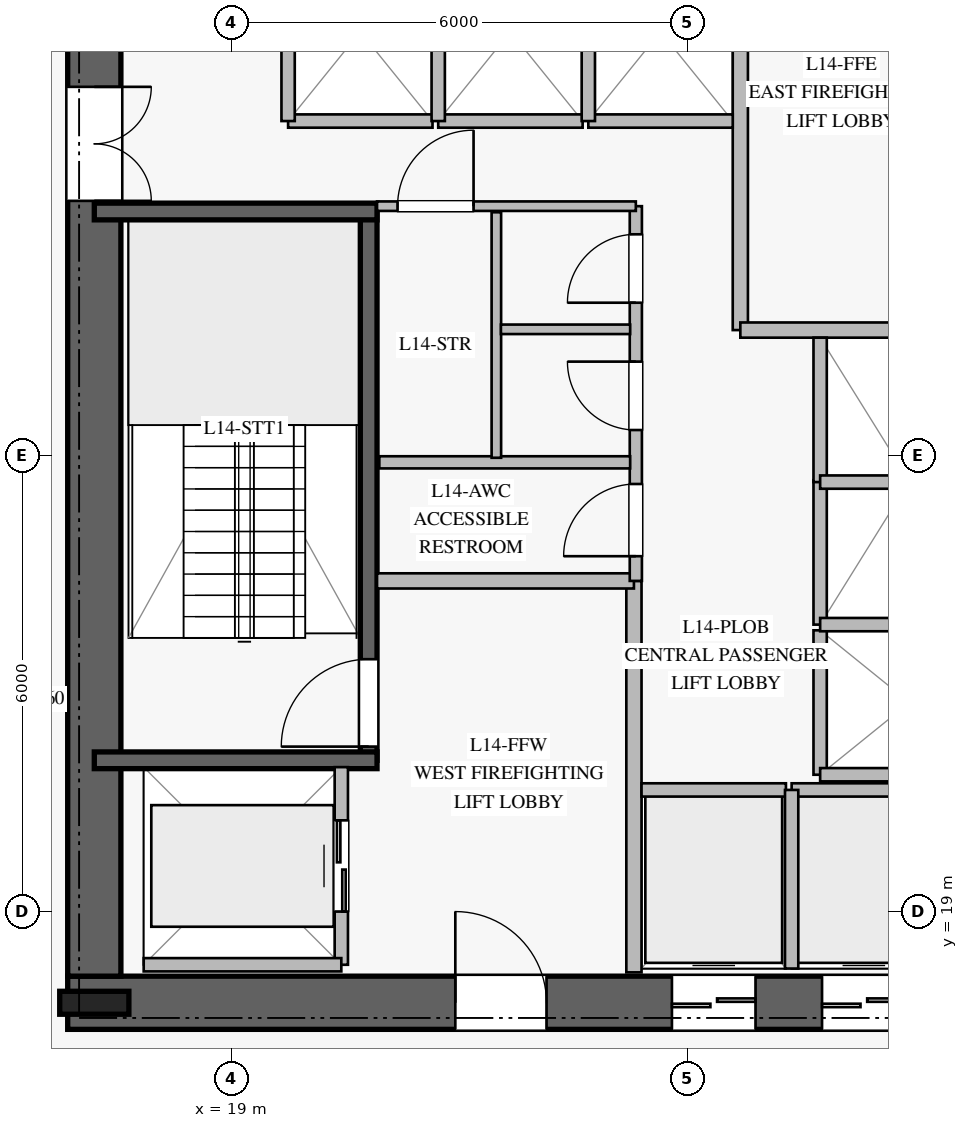
"""IFC4 building model, lengths in metres.
Left out: names, types, materials, properties, quantities, classifications, styles, units other than length and angle.
Written with IfcOpenShell. Run it as: python <this file> out.ifc"""

import sys

from ifc_helpers import new_model, si_unit, direction, frame, frame_2d, origin, origin_2d, place, context, subcontext, project, spatial, rectangle, i_section, extrude, element, fill, save


model = new_model("IFC4")
c1 = context("Model", 3, precision=1e-05, world=origin(), true_north=direction((0.0, 1.0)))
c2 = subcontext(c1, "Body", "Model", "MODEL_VIEW")
j1 = project(units=[si_unit("LENGTHUNIT", "METRE"), si_unit("PLANEANGLEUNIT", "RADIAN")], contexts=[c1])
p1 = place(None, origin())
s1 = spatial("IfcSite", under=j1, at=p1, CompositionType="ELEMENT")
p2 = place(p1, origin())
s2 = spatial("IfcBuilding", under=s1, at=p2, CompositionType="ELEMENT")
p3 = place(p2, frame((0.0, 0.0, 60.0)))
s3 = spatial("IfcBuildingStorey", under=s2, at=p3, CompositionType="ELEMENT", Elevation=60.0)
p4 = place(p3, frame((16.85, 17.8, 0.0), z_axis=(0.0, 0.0, 1.0), x_axis=(1.0, 0.0, 0.0)))
e1 = element("IfcWall", 1, at=p4, inside=s3, PredefinedType="SHEAR", context=c2, shape_type="SweptSolid", body=[
    extrude(rectangle(XDim=16.3, YDim=0.7, at=frame_2d((8.15, 0.0))), origin(), (0.0, 0.0, 1.0), 3.76),
])
p5 = place(p4, frame((5.1, 0.0, 0.0)))
e2 = element("IfcOpeningElement", 2, at=p5, cuts=e1, PredefinedType="OPENING", context=c2, shape_type="SweptSolid", body=[
    extrude(rectangle(XDim=1.2, YDim=2.25, at=frame_2d((0.6, 1.125))), frame((0.0, 0.36, 0.0), z_axis=(0.0, -1.0, 0.0), x_axis=(1.0, 0.0, 0.0)), (0.0, 0.0, 1.0), 0.72),
])
p6 = place(p4, frame((14.05, 0.0, 0.0)))
e3 = element("IfcOpeningElement", 3, at=p6, cuts=e1, PredefinedType="OPENING", context=c2, shape_type="SweptSolid", body=[
    extrude(rectangle(XDim=0.9, YDim=2.1, at=frame_2d((0.45, 1.05))), frame((0.0, 0.36, 0.0), z_axis=(0.0, -1.0, 0.0), x_axis=(1.0, 0.0, 0.0)), (0.0, 0.0, 1.0), 0.72),
])
p7 = place(p4, frame((7.95, 0.0, 0.0)))
e4 = element("IfcOpeningElement", 4, at=p7, cuts=e1, PredefinedType="OPENING", context=c2, shape_type="SweptSolid", body=[
    extrude(rectangle(XDim=1.1, YDim=2.2, at=frame_2d((0.55, 1.1))), frame((0.0, 0.36, 0.0), z_axis=(0.0, -1.0, 0.0), x_axis=(1.0, 0.0, 0.0)), (0.0, 0.0, 1.0), 0.72),
])
p8 = place(p4, frame((9.925, 0.0, 0.0)))
e5 = element("IfcOpeningElement", 5, at=p8, cuts=e1, PredefinedType="OPENING", context=c2, shape_type="SweptSolid", body=[
    extrude(rectangle(XDim=1.1, YDim=2.2, at=frame_2d((0.55, 1.1))), frame((0.0, 0.36, 0.0), z_axis=(0.0, -1.0, 0.0), x_axis=(1.0, 0.0, 0.0)), (0.0, 0.0, 1.0), 0.72),
])
p9 = place(p4, frame((11.9, 0.0, 0.0)))
e6 = element("IfcOpeningElement", 6, at=p9, cuts=e1, PredefinedType="OPENING", context=c2, shape_type="SweptSolid", body=[
    extrude(rectangle(XDim=1.1, YDim=2.2, at=frame_2d((0.55, 1.1))), frame((0.0, 0.36, 0.0), z_axis=(0.0, -1.0, 0.0), x_axis=(1.0, 0.0, 0.0)), (0.0, 0.0, 1.0), 0.72),
])
p10 = place(p3, frame((17.2, 31.85, 0.0), z_axis=(0.0, 0.0, 1.0), x_axis=(0.0, -1.0, 0.0)))
e7 = element("IfcWall", 7, at=p10, inside=s3, PredefinedType="SHEAR", context=c2, shape_type="SweptSolid", body=[
    extrude(rectangle(XDim=13.7, YDim=0.7, at=frame_2d((6.85, 0.0))), origin(), (0.0, 0.0, 1.0), 3.76),
])
p11 = place(p10, frame((2.0, 0.0, 0.0)))
e8 = element("IfcOpeningElement", 8, at=p11, cuts=e7, PredefinedType="OPENING", context=c2, shape_type="SweptSolid", body=[
    extrude(rectangle(XDim=1.5, YDim=2.2, at=frame_2d((0.75, 1.1))), frame((0.0, 0.36, 0.0), z_axis=(0.0, -1.0, 0.0), x_axis=(1.0, 0.0, 0.0)), (0.0, 0.0, 1.0), 0.72),
])
p12 = place(p3, frame((17.2, 17.8, 0.0), z_axis=(0.0, 0.0, 1.0), x_axis=(1.0, 0.0, 0.0)))
e9 = element("IfcColumn", 9, at=p12, inside=s3, PredefinedType="COLUMN", context=c2, shape_type="SweptSolid", body=[
    extrude(i_section(OverallWidth=0.302, OverallDepth=0.91, WebThickness=0.021, FlangeThickness=0.04, at=origin_2d()), origin(), (0.0, 0.0, 1.0), 4.0),
])
p13 = place(p3, frame((20.81, 20.99, 0.0), z_axis=(0.0, 0.0, 1.0), x_axis=(0.0, 1.0, 0.0)))
e10 = element("IfcWall", 10, at=p13, inside=s3, PredefinedType="SOLIDWALL", context=c2, shape_type="SweptSolid", body=[
    extrude(rectangle(XDim=7.22, YDim=0.22, at=frame_2d((3.61, 0.0))), origin(), (0.0, 0.0, 1.0), 3.76),
])
p14 = place(p13, frame((0.18, 0.0, 0.0)))
e11 = element("IfcOpeningElement", 11, at=p14, cuts=e10, PredefinedType="OPENING", context=c2, shape_type="SweptSolid", body=[
    extrude(rectangle(XDim=1.15, YDim=2.2, at=frame_2d((0.575, 1.1))), frame((0.0, 0.12, 0.0), z_axis=(0.0, -1.0, 0.0), x_axis=(1.0, 0.0, 0.0)), (0.0, 0.0, 1.0), 0.24),
])
for number, where, z_axis, x_axis in (
    (12, (17.2, 20.99, 0.0), (0.0, 0.0, 1.0), (1.0, 0.0, 0.0)),
    (13, (17.2, 28.21, 0.0), (0.0, 0.0, 1.0), (1.0, 0.0, 0.0)),
):
    element("IfcWall", number, at=place(p3, frame(where, z_axis=z_axis, x_axis=x_axis)), inside=s3, PredefinedType="SOLIDWALL", context=c2, shape_type="SweptSolid", body=[
        extrude(rectangle(XDim=3.72, YDim=0.22, at=frame_2d((1.86, 0.0))), origin(), (0.0, 0.0, 1.0), 3.76),
    ])
p15 = place(p3, frame((24.3, 18.2, 0.0), z_axis=(0.0, 0.0, 1.0), x_axis=(0.0, 1.0, 0.0)))
e14 = element("IfcWall", 14, at=p15, inside=s3, PredefinedType="PARTITIONING", context=c2, shape_type="SweptSolid", body=[
    extrude(rectangle(XDim=5.15, YDim=0.2, at=frame_2d((2.575, 0.0))), origin(), (0.0, 0.0, 1.0), 3.76),
])
p16 = place(p3, frame((20.92, 23.35, 0.0), z_axis=(0.0, 0.0, 1.0), x_axis=(1.0, 0.0, 0.0)))
e15 = element("IfcWall", 15, at=p16, inside=s3, PredefinedType="PARTITIONING", context=c2, shape_type="SweptSolid", body=[
    extrude(rectangle(XDim=3.38, YDim=0.2, at=frame_2d((1.69, 0.0))), origin(), (0.0, 0.0, 1.0), 3.76),
])
p17 = place(p3, frame((25.7, 26.65, 0.0), z_axis=(0.0, 0.0, 1.0), x_axis=(0.0, 1.0, 0.0)))
e16 = element("IfcWall", 16, at=p17, inside=s3, PredefinedType="PARTITIONING", context=c2, shape_type="SweptSolid", body=[
    extrude(rectangle(XDim=5.15, YDim=0.2, at=frame_2d((2.575, 0.0))), origin(), (0.0, 0.0, 1.0), 3.76),
])
p18 = place(p3, frame((25.7, 26.65, 0.0), z_axis=(0.0, 0.0, 1.0), x_axis=(1.0, 0.0, 0.0)))
e17 = element("IfcWall", 17, at=p18, inside=s3, PredefinedType="PARTITIONING", context=c2, shape_type="SweptSolid", body=[
    extrude(rectangle(XDim=3.38, YDim=0.2, at=frame_2d((1.69, 0.0))), origin(), (0.0, 0.0, 1.0), 3.76),
])
p19 = place(p3, frame((24.325, 23.35, 0.0), z_axis=(0.0, 0.0, 1.0), x_axis=(0.0, 1.0, 0.0)))
e18 = element("IfcWall", 18, at=p19, inside=s3, PredefinedType="PLUMBINGWALL", context=c2, shape_type="SweptSolid", body=[
    extrude(rectangle(XDim=4.93, YDim=0.16, at=frame_2d((2.465, 0.0))), origin(), (0.0, 0.0, 1.0), 3.76),
])
p20 = place(p19, frame((0.325, 0.0, 0.0)))
e19 = element("IfcOpeningElement", 19, at=p20, cuts=e18, PredefinedType="OPENING", context=c2, shape_type="SweptSolid", body=[
    extrude(rectangle(XDim=0.95, YDim=2.1, at=frame_2d((0.475, 1.05))), frame((0.0, 0.09, 0.0), z_axis=(0.0, -1.0, 0.0), x_axis=(1.0, 0.0, 0.0)), (0.0, 0.0, 1.0), 0.18),
])
p21 = place(p19, frame((1.985, 0.0, 0.0)))
e20 = element("IfcOpeningElement", 20, at=p21, cuts=e18, PredefinedType="OPENING", context=c2, shape_type="SweptSolid", body=[
    extrude(rectangle(XDim=0.9, YDim=2.1, at=frame_2d((0.45, 1.05))), frame((0.0, 0.09, 0.0), z_axis=(0.0, -1.0, 0.0), x_axis=(1.0, 0.0, 0.0)), (0.0, 0.0, 1.0), 0.18),
])
p22 = place(p19, frame((3.66, 0.0, 0.0)))
e21 = element("IfcOpeningElement", 21, at=p22, cuts=e18, PredefinedType="OPENING", context=c2, shape_type="SweptSolid", body=[
    extrude(rectangle(XDim=0.9, YDim=2.1, at=frame_2d((0.45, 1.05))), frame((0.0, 0.09, 0.0), z_axis=(0.0, -1.0, 0.0), x_axis=(1.0, 0.0, 0.0)), (0.0, 0.0, 1.0), 0.18),
])
p23 = place(p3, frame((20.92, 28.28, 0.0), z_axis=(0.0, 0.0, 1.0), x_axis=(1.0, 0.0, 0.0)))
e22 = element("IfcWall", 22, at=p23, inside=s3, PredefinedType="PARTITIONING", context=c2, shape_type="SweptSolid", body=[
    extrude(rectangle(XDim=3.405, YDim=0.125, at=frame_2d((1.703, 0.0))), origin(), (0.0, 0.0, 1.0), 3.76),
])
p24 = place(p23, frame((0.27, 0.0, 0.0)))
e23 = element("IfcOpeningElement", 23, at=p24, cuts=e22, PredefinedType="OPENING", context=c2, shape_type="SweptSolid", body=[
    extrude(rectangle(XDim=1.0, YDim=2.15, at=frame_2d((0.5, 1.075))), frame((0.0, 0.073, 0.0), z_axis=(0.0, -1.0, 0.0), x_axis=(1.0, 0.0, 0.0)), (0.0, 0.0, 1.0), 0.145),
])
p25 = place(p3, frame((20.95, 24.91, 0.0), z_axis=(0.0, 0.0, 1.0), x_axis=(1.0, 0.0, 0.0)))
e24 = element("IfcWall", 24, at=p25, inside=s3, PredefinedType="PLUMBINGWALL", context=c2, shape_type="SweptSolid", body=[
    extrude(rectangle(XDim=3.3, YDim=0.16, at=frame_2d((1.65, 0.0))), origin(), (0.0, 0.0, 1.0), 3.76),
])
p26 = place(p3, frame((22.49, 24.97, 0.0), z_axis=(0.0, 0.0, 1.0), x_axis=(0.0, 1.0, 0.0)))
e25 = element("IfcWall", 25, at=p26, inside=s3, PredefinedType="PARTITIONING", context=c2, shape_type="SweptSolid", body=[
    extrude(rectangle(XDim=3.23, YDim=0.125, at=frame_2d((1.615, 0.0))), origin(), (0.0, 0.0, 1.0), 3.76),
])
p27 = place(p3, frame((22.55, 26.66, 0.0), z_axis=(0.0, 0.0, 1.0), x_axis=(1.0, 0.0, 0.0)))
e26 = element("IfcWall", 26, at=p27, inside=s3, PredefinedType="PARTITIONING", context=c2, shape_type="SweptSolid", body=[
    extrude(rectangle(XDim=1.7, YDim=0.125, at=frame_2d((0.85, 0.0))), origin(), (0.0, 0.0, 1.0), 3.76),
])
p28 = place(p3, frame((24.4, 20.6, 0.0), z_axis=(0.0, 0.0, 1.0), x_axis=(1.0, 0.0, 0.0)))
e27 = element("IfcWall", 27, at=p28, inside=s3, PredefinedType="PARTITIONING", context=c2, shape_type="SweptSolid", body=[
    extrude(rectangle(XDim=1.9, YDim=0.175, at=frame_2d((0.95, 0.0))), origin(), (0.0, 0.0, 1.0), 3.76),
])
p29 = place(p3, frame((26.375, 20.6, 0.0), z_axis=(0.0, 0.0, 1.0), x_axis=(1.0, 0.0, 0.0)))
e28 = element("IfcWall", 28, at=p29, inside=s3, PredefinedType="PARTITIONING", context=c2, shape_type="SweptSolid", body=[
    extrude(rectangle(XDim=1.9, YDim=0.175, at=frame_2d((0.95, 0.0))), origin(), (0.0, 0.0, 1.0), 3.76),
])
p30 = place(p3, frame((26.375, 18.25, 0.0), z_axis=(0.0, 0.0, 1.0), x_axis=(0.0, 1.0, 0.0)))
e29 = element("IfcWall", 29, at=p30, inside=s3, PredefinedType="PARTITIONING", context=c2, shape_type="SweptSolid", body=[
    extrude(rectangle(XDim=2.35, YDim=0.175, at=frame_2d((1.175, 0.0))), origin(), (0.0, 0.0, 1.0), 3.76),
])
p31 = place(p3, frame((19.75, 29.4, 0.0), z_axis=(0.0, 0.0, 1.0), x_axis=(1.0, 0.0, 0.0)))
e30 = element("IfcWall", 30, at=p31, inside=s3, PredefinedType="PARTITIONING", context=c2, shape_type="SweptSolid", body=[
    extrude(rectangle(XDim=1.9, YDim=0.175, at=frame_2d((0.95, 0.0))), origin(), (0.0, 0.0, 1.0), 3.76),
])
p32 = place(p3, frame((19.75, 29.4, 0.0), z_axis=(0.0, 0.0, 1.0), x_axis=(0.0, 1.0, 0.0)))
e31 = element("IfcWall", 31, at=p32, inside=s3, PredefinedType="PARTITIONING", context=c2, shape_type="SweptSolid", body=[
    extrude(rectangle(XDim=2.35, YDim=0.175, at=frame_2d((1.175, 0.0))), origin(), (0.0, 0.0, 1.0), 3.76),
])
p33 = place(p3, frame((21.725, 29.4, 0.0), z_axis=(0.0, 0.0, 1.0), x_axis=(1.0, 0.0, 0.0)))
e32 = element("IfcWall", 32, at=p33, inside=s3, PredefinedType="PARTITIONING", context=c2, shape_type="SweptSolid", body=[
    extrude(rectangle(XDim=1.9, YDim=0.175, at=frame_2d((0.95, 0.0))), origin(), (0.0, 0.0, 1.0), 3.76),
])
p34 = place(p3, frame((21.725, 29.4, 0.0), z_axis=(0.0, 0.0, 1.0), x_axis=(0.0, 1.0, 0.0)))
e33 = element("IfcWall", 33, at=p34, inside=s3, PredefinedType="PARTITIONING", context=c2, shape_type="SweptSolid", body=[
    extrude(rectangle(XDim=2.35, YDim=0.175, at=frame_2d((1.175, 0.0))), origin(), (0.0, 0.0, 1.0), 3.76),
])
p35 = place(p3, frame((23.7, 29.4, 0.0), z_axis=(0.0, 0.0, 1.0), x_axis=(1.0, 0.0, 0.0)))
e34 = element("IfcWall", 34, at=p35, inside=s3, PredefinedType="PARTITIONING", context=c2, shape_type="SweptSolid", body=[
    extrude(rectangle(XDim=1.9, YDim=0.175, at=frame_2d((0.95, 0.0))), origin(), (0.0, 0.0, 1.0), 3.76),
])
p36 = place(p3, frame((23.7, 29.4, 0.0), z_axis=(0.0, 0.0, 1.0), x_axis=(0.0, 1.0, 0.0)))
e35 = element("IfcWall", 35, at=p36, inside=s3, PredefinedType="PARTITIONING", context=c2, shape_type="SweptSolid", body=[
    extrude(rectangle(XDim=2.35, YDim=0.175, at=frame_2d((1.175, 0.0))), origin(), (0.0, 0.0, 1.0), 3.76),
])
p37 = place(p3, frame((26.75, 20.8, 0.0), z_axis=(0.0, 0.0, 1.0), x_axis=(0.0, 1.0, 0.0)))
e36 = element("IfcWall", 36, at=p37, inside=s3, PredefinedType="PARTITIONING", context=c2, shape_type="SweptSolid", body=[
    extrude(rectangle(XDim=1.9, YDim=0.175, at=frame_2d((0.95, 0.0))), origin(), (0.0, 0.0, 1.0), 3.76),
])
p38 = place(p3, frame((26.75, 20.8, 0.0), z_axis=(0.0, 0.0, 1.0), x_axis=(1.0, 0.0, 0.0)))
e37 = element("IfcWall", 37, at=p38, inside=s3, PredefinedType="PARTITIONING", context=c2, shape_type="SweptSolid", body=[
    extrude(rectangle(XDim=2.35, YDim=0.175, at=frame_2d((1.175, 0.0))), origin(), (0.0, 0.0, 1.0), 3.76),
])
p39 = place(p3, frame((26.75, 22.775, 0.0), z_axis=(0.0, 0.0, 1.0), x_axis=(0.0, 1.0, 0.0)))
e38 = element("IfcWall", 38, at=p39, inside=s3, PredefinedType="PARTITIONING", context=c2, shape_type="SweptSolid", body=[
    extrude(rectangle(XDim=1.9, YDim=0.175, at=frame_2d((0.95, 0.0))), origin(), (0.0, 0.0, 1.0), 3.76),
])
p40 = place(p3, frame((26.75, 22.775, 0.0), z_axis=(0.0, 0.0, 1.0), x_axis=(1.0, 0.0, 0.0)))
e39 = element("IfcWall", 39, at=p40, inside=s3, PredefinedType="PARTITIONING", context=c2, shape_type="SweptSolid", body=[
    extrude(rectangle(XDim=2.35, YDim=0.175, at=frame_2d((1.175, 0.0))), origin(), (0.0, 0.0, 1.0), 3.76),
])
p41 = place(p3, frame((26.75, 24.65, 0.0), z_axis=(0.0, 0.0, 1.0), x_axis=(0.0, 1.0, 0.0)))
e40 = element("IfcWall", 40, at=p41, inside=s3, PredefinedType="PARTITIONING", context=c2, shape_type="SweptSolid", body=[
    extrude(rectangle(XDim=1.9, YDim=0.175, at=frame_2d((0.95, 0.0))), origin(), (0.0, 0.0, 1.0), 3.76),
])
p42 = place(p3, frame((26.75, 24.65, 0.0), z_axis=(0.0, 0.0, 1.0), x_axis=(1.0, 0.0, 0.0)))
e41 = element("IfcWall", 41, at=p42, inside=s3, PredefinedType="PARTITIONING", context=c2, shape_type="SweptSolid", body=[
    extrude(rectangle(XDim=2.35, YDim=0.175, at=frame_2d((1.175, 0.0))), origin(), (0.0, 0.0, 1.0), 3.76),
])
p43 = place(p3, frame((20.45, 18.3, 0.0), z_axis=(0.0, 0.0, 1.0), x_axis=(0.0, 1.0, 0.0)))
e42 = element("IfcWall", 42, at=p43, inside=s3, PredefinedType="PARTITIONING", context=c2, shape_type="SweptSolid", body=[
    extrude(rectangle(XDim=2.6, YDim=0.175, at=frame_2d((1.3, 0.0))), origin(), (0.0, 0.0, 1.0), 3.76),
])
p44 = place(p43, frame((0.7, 0.0, 0.0)))
e43 = element("IfcOpeningElement", 43, at=p44, cuts=e42, PredefinedType="OPENING", context=c2, shape_type="SweptSolid", body=[
    extrude(rectangle(XDim=1.2, YDim=2.2, at=frame_2d((0.6, 1.1))), frame((0.0, 0.098, 0.0), z_axis=(0.0, -1.0, 0.0), x_axis=(1.0, 0.0, 0.0)), (0.0, 0.0, 1.0), 0.195),
])
p45 = place(p3, frame((17.85, 18.3, 0.0), z_axis=(0.0, 0.0, 1.0), x_axis=(1.0, 0.0, 0.0)))
e44 = element("IfcWall", 44, at=p45, inside=s3, PredefinedType="PARTITIONING", context=c2, shape_type="SweptSolid", body=[
    extrude(rectangle(XDim=2.6, YDim=0.175, at=frame_2d((1.3, 0.0))), origin(), (0.0, 0.0, 1.0), 3.76),
])
p46 = place(p14, origin())
e45 = element("IfcDoor", 45, at=p46, inside=s3, OperationType="SINGLE_SWING_LEFT", PredefinedType="DOOR", context=c2, shape_type="SweptSolid", body=[
    extrude(rectangle(XDim=1.15, YDim=2.2, at=frame_2d((0.575, 1.1))), frame((0.0, 0.025, 0.0), z_axis=(0.0, -1.0, 0.0), x_axis=(1.0, 0.0, 0.0)), (0.0, 0.0, 1.0), 0.05),
])
fill(e11, e45)
p47 = place(p5, origin())
e46 = element("IfcDoor", 46, at=p47, inside=s3, OperationType="SINGLE_SWING_LEFT", PredefinedType="DOOR", context=c2, shape_type="SweptSolid", body=[
    extrude(rectangle(XDim=1.2, YDim=2.25, at=frame_2d((0.6, 1.125))), frame((0.0, 0.025, 0.0), z_axis=(0.0, -1.0, 0.0), x_axis=(1.0, 0.0, 0.0)), (0.0, 0.0, 1.0), 0.05),
])
fill(e2, e46)
p48 = place(p11, origin())
e47 = element("IfcDoor", 47, at=p48, inside=s3, OperationType="DOUBLE_DOOR_SINGLE_SWING", PredefinedType="DOOR", context=c2, shape_type="SweptSolid", body=[
    extrude(rectangle(XDim=1.5, YDim=2.2, at=frame_2d((0.75, 1.1))), frame((0.0, 0.025, 0.0), z_axis=(0.0, -1.0, 0.0), x_axis=(1.0, 0.0, 0.0)), (0.0, 0.0, 1.0), 0.05),
])
fill(e8, e47)
p49 = place(p20, origin())
e48 = element("IfcDoor", 48, at=p49, inside=s3, OperationType="SINGLE_SWING_LEFT", PredefinedType="DOOR", context=c2, shape_type="SweptSolid", body=[
    extrude(rectangle(XDim=0.95, YDim=2.1, at=frame_2d((0.475, 1.05))), frame((0.0, 0.025, 0.0), z_axis=(0.0, -1.0, 0.0), x_axis=(1.0, 0.0, 0.0)), (0.0, 0.0, 1.0), 0.05),
])
fill(e19, e48)
p50 = place(p21, origin())
e49 = element("IfcDoor", 49, at=p50, inside=s3, OperationType="SINGLE_SWING_RIGHT", PredefinedType="DOOR", context=c2, shape_type="SweptSolid", body=[
    extrude(rectangle(XDim=0.9, YDim=2.1, at=frame_2d((0.45, 1.05))), frame((0.0, 0.025, 0.0), z_axis=(0.0, -1.0, 0.0), x_axis=(1.0, 0.0, 0.0)), (0.0, 0.0, 1.0), 0.05),
])
fill(e20, e49)
p51 = place(p22, origin())
e50 = element("IfcDoor", 50, at=p51, inside=s3, OperationType="SINGLE_SWING_LEFT", PredefinedType="DOOR", context=c2, shape_type="SweptSolid", body=[
    extrude(rectangle(XDim=0.9, YDim=2.1, at=frame_2d((0.45, 1.05))), frame((0.0, 0.025, 0.0), z_axis=(0.0, -1.0, 0.0), x_axis=(1.0, 0.0, 0.0)), (0.0, 0.0, 1.0), 0.05),
])
fill(e21, e50)
p52 = place(p24, origin())
e51 = element("IfcDoor", 51, at=p52, inside=s3, OperationType="SINGLE_SWING_RIGHT", PredefinedType="DOOR", context=c2, shape_type="SweptSolid", body=[
    extrude(rectangle(XDim=1.0, YDim=2.15, at=frame_2d((0.5, 1.075))), frame((0.0, 0.025, 0.0), z_axis=(0.0, -1.0, 0.0), x_axis=(1.0, 0.0, 0.0)), (0.0, 0.0, 1.0), 0.05),
])
fill(e23, e51)
p53 = place(p7, origin())
e52 = element("IfcDoor", 52, at=p53, inside=s3, OperationType="DOUBLE_DOOR_SLIDING", PredefinedType="DOOR", context=c2, shape_type="SweptSolid", body=[
    extrude(rectangle(XDim=1.1, YDim=2.2, at=frame_2d((0.55, 1.1))), frame((0.0, 0.025, 0.0), z_axis=(0.0, -1.0, 0.0), x_axis=(1.0, 0.0, 0.0)), (0.0, 0.0, 1.0), 0.05),
])
fill(e4, e52)
p54 = place(p8, origin())
e53 = element("IfcDoor", 53, at=p54, inside=s3, OperationType="DOUBLE_DOOR_SLIDING", PredefinedType="DOOR", context=c2, shape_type="SweptSolid", body=[
    extrude(rectangle(XDim=1.1, YDim=2.2, at=frame_2d((0.55, 1.1))), frame((0.0, 0.025, 0.0), z_axis=(0.0, -1.0, 0.0), x_axis=(1.0, 0.0, 0.0)), (0.0, 0.0, 1.0), 0.05),
])
fill(e5, e53)
p55 = place(p44, origin())
e54 = element("IfcDoor", 54, at=p55, inside=s3, OperationType="DOUBLE_DOOR_SLIDING", PredefinedType="DOOR", context=c2, shape_type="SweptSolid", body=[
    extrude(rectangle(XDim=1.2, YDim=2.2, at=frame_2d((0.6, 1.1))), frame((0.0, 0.025, 0.0), z_axis=(0.0, -1.0, 0.0), x_axis=(1.0, 0.0, 0.0)), (0.0, 0.0, 1.0), 0.05),
])
fill(e43, e54)
save(model, sys.argv[1])
